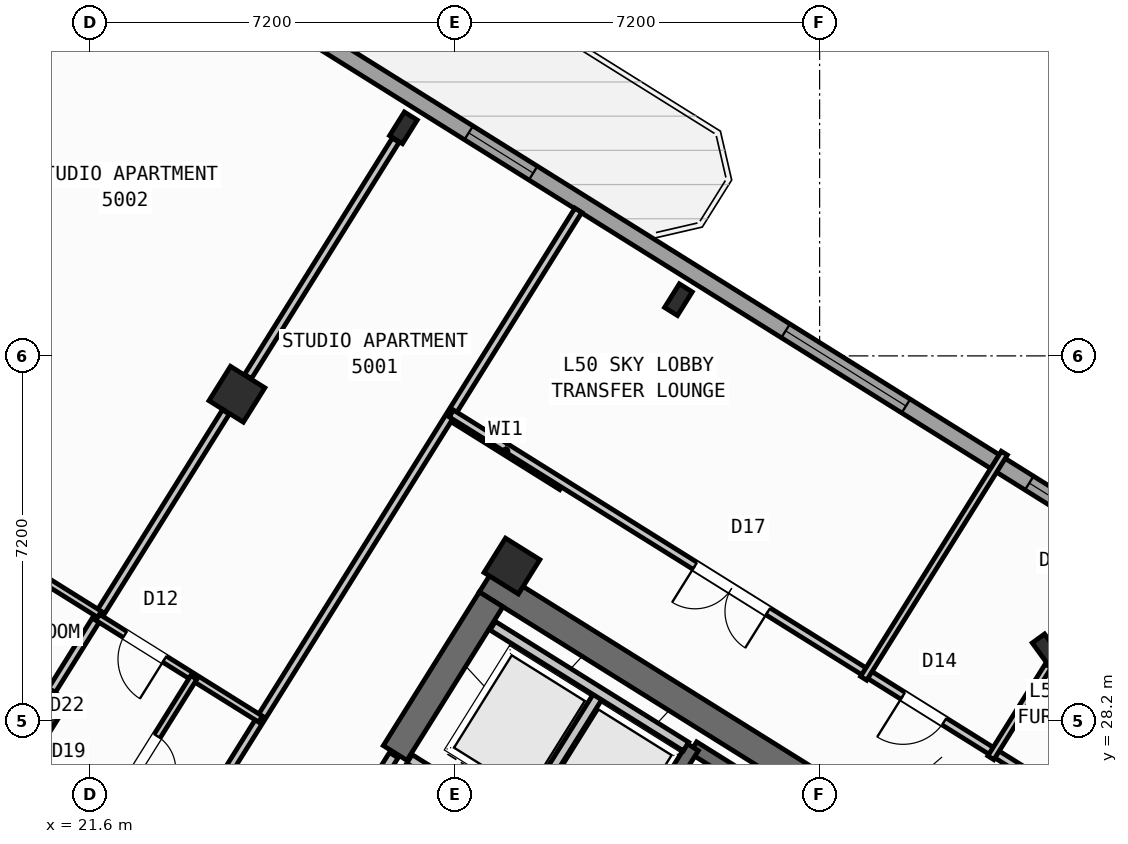
"""IFC4 building model, lengths in metres.
Left out: names, types, materials, properties, quantities, classifications, styles, units other than length and angle.
Written with IfcOpenShell. Run it as: python <this file> out.ifc"""

import sys

from ifc_helpers import new_model, si_unit, direction, frame, frame_2d, origin, origin_2d, place, context, subcontext, project, spatial, rectangle, hollow_rectangle, i_section, extrude, source, transform, mapped, element, fill, save


model = new_model("IFC4")
c1 = context("Model", 3, precision=1e-05, world=origin(), true_north=direction((0.0, 1.0)))
c2 = subcontext(c1, "Body", "Model", "MODEL_VIEW")
j1 = project(units=[si_unit("LENGTHUNIT", "METRE"), si_unit("PLANEANGLEUNIT", "RADIAN")], contexts=[c1])
p1 = place(None, origin())
s1 = spatial("IfcSite", under=j1, at=p1, CompositionType="ELEMENT")
p2 = place(p1, origin())
s2 = spatial("IfcBuilding", under=s1, at=p2, CompositionType="ELEMENT")
p3 = place(p2, frame((0.0, 0.0, 199.5)))
s3 = spatial("IfcBuildingStorey", under=s2, at=p3, CompositionType="ELEMENT", Elevation=199.5)
p4 = place(p3, frame((40.573, 24.01, 0.0), z_axis=(0.0, 0.0, 1.0), x_axis=(-0.848047359947, 0.529920442413, 0.0)))
e1 = element("IfcWall", 1, at=p4, inside=s3, PredefinedType="SHEAR", context=c2, shape_type="SweptSolid", body=[
    extrude(rectangle(XDim=13.14, YDim=0.55, at=frame_2d((6.57, 0.0))), origin(), (0.0, 0.0, 1.0), 4.25),
])
p5 = place(p3, frame((29.517, 30.594, 0.0), z_axis=(0.0, 0.0, 1.0), x_axis=(-0.529906864564, -0.848055844204, 0.0)))
e2 = element("IfcWall", 2, at=p5, inside=s3, PredefinedType="SHEAR", context=c2, shape_type="SweptSolid", body=[
    extrude(rectangle(XDim=3.575, YDim=0.55, at=frame_2d((1.788, 0.0))), origin(), (0.0, 0.0, 1.0), 4.25),
])
m1 = source(origin(), c2, "Body", "SweptSolid", [
    extrude(i_section(OverallWidth=0.3, OverallDepth=0.55, WebThickness=0.015, FlangeThickness=0.029, at=origin_2d()), origin(), (0.0, 0.0, 1.0), 4.5),
])
p6 = place(p3, frame((33.213, 36.509, 0.0), z_axis=(0.0, 0.0, 1.0), x_axis=(-0.848048096156, 0.529919264233, 0.0)))
e3 = element("IfcColumn", 3, at=p6, inside=s3, PredefinedType="COLUMN", context=c2, shape_type="MappedRepresentation", body=[
    mapped(m1, transform((0.0, 0.0, 0.0), scale=1.0)),
])
m2 = source(origin(), c2, "Body", "SweptSolid", [
    extrude(hollow_rectangle(XDim=0.8, YDim=0.8, WallThickness=0.032, at=origin_2d()), origin(), (0.0, 0.0, 1.0), 4.5),
])
p7 = place(p3, frame((29.928, 31.251, 0.0), z_axis=(0.0, 0.0, 1.0), x_axis=(-0.848048096156, 0.529919264233, 0.0)))
e4 = element("IfcColumn", 4, at=p7, inside=s3, PredefinedType="COLUMN", context=c2, shape_type="MappedRepresentation", body=[
    mapped(m2, transform((0.0, 0.0, 0.0), scale=1.0)),
])
p8 = place(p3, frame((27.786, 39.901, 0.0), z_axis=(0.0, 0.0, 1.0), x_axis=(-0.848048096156, 0.529919264233, 0.0)))
e5 = element("IfcColumn", 5, at=p8, inside=s3, PredefinedType="COLUMN", context=c2, shape_type="MappedRepresentation", body=[
    mapped(m1, transform((0.0, 0.0, 0.0), scale=1.0)),
])
for number, where, z_axis, x_axis in (
    (6, (24.5, 34.643, 0.0), (0.0, 0.0, 1.0), (-0.848, 0.53, 0.0)),
    (7, (20.632, 28.452, 0.0), (0.0, 0.0, 1.0), (-0.848, 0.53, 0.0)),
):
    element("IfcColumn", number, at=place(p3, frame(where, z_axis=z_axis, x_axis=x_axis)), inside=s3, PredefinedType="COLUMN", context=c2, shape_type="MappedRepresentation", body=[
        mapped(m2, transform((0.0, 0.0, 0.0), scale=1.0)),
    ])
p9 = place(p3, frame((40.479, 29.601, 0.0), z_axis=(0.0, 0.0, 1.0), x_axis=(0.809016994375, 0.587785252292, 0.0)))
e8 = element("IfcColumn", 8, at=p9, inside=s3, PredefinedType="COLUMN", context=c2, shape_type="MappedRepresentation", body=[
    mapped(m1, transform((0.0, 0.0, 0.0), scale=1.0)),
])
p10 = place(p3, frame((31.76, 12.183, 0.0), z_axis=(0.0, 0.0, 1.0), x_axis=(-0.848047074256, 0.529920899612, 0.0)))
e9 = element("IfcWall", 9, at=p10, inside=s3, PredefinedType="STANDARD", context=c2, shape_type="SweptSolid", body=[
    extrude(rectangle(XDim=30.652, YDim=0.32, at=frame_2d((15.326, 0.0))), origin(), (0.0, 0.0, 1.0), 4.25),
])
p11 = place(p10, frame((15.166, 0.0, 0.0)))
e10 = element("IfcOpeningElement", 10, at=p11, cuts=e9, PredefinedType="OPENING", context=c2, shape_type="SweptSolid", body=[
    extrude(rectangle(XDim=1.2, YDim=2.15, at=frame_2d((0.6, 1.075))), frame((0.0, 0.17, 0.0), z_axis=(0.0, -1.0, 0.0), x_axis=(1.0, 0.0, 0.0)), (0.0, 0.0, 1.0), 0.34),
])
p12 = place(p10, frame((1.665, 0.0, 0.65)))
e11 = element("IfcOpeningElement", 11, at=p12, cuts=e9, PredefinedType="OPENING", context=c2, shape_type="SweptSolid", body=[
    extrude(rectangle(XDim=2.8, YDim=2.1, at=frame_2d((1.4, 1.05))), frame((0.0, 0.17, 0.0), z_axis=(0.0, -1.0, 0.0), x_axis=(1.0, 0.0, 0.0)), (0.0, 0.0, 1.0), 0.34),
])
p13 = place(p10, frame((6.894, 0.0, 0.65)))
e12 = element("IfcOpeningElement", 12, at=p13, cuts=e9, PredefinedType="OPENING", context=c2, shape_type="SweptSolid", body=[
    extrude(rectangle(XDim=2.8, YDim=2.1, at=frame_2d((1.4, 1.05))), frame((0.0, 0.17, 0.0), z_axis=(0.0, -1.0, 0.0), x_axis=(1.0, 0.0, 0.0)), (0.0, 0.0, 1.0), 0.34),
])
p14 = place(p10, frame((20.453, 0.0, 0.85)))
e13 = element("IfcOpeningElement", 13, at=p14, cuts=e9, PredefinedType="OPENING", context=c2, shape_type="SweptSolid", body=[
    extrude(rectangle(XDim=1.5, YDim=1.5, at=frame_2d((0.75, 0.75))), frame((0.0, 0.17, 0.0), z_axis=(0.0, -1.0, 0.0), x_axis=(1.0, 0.0, 0.0)), (0.0, 0.0, 1.0), 0.34),
])
p15 = place(p10, frame((26.258, 0.0, 0.65)))
e14 = element("IfcOpeningElement", 14, at=p15, cuts=e9, PredefinedType="OPENING", context=c2, shape_type="SweptSolid", body=[
    extrude(rectangle(XDim=2.8, YDim=2.1, at=frame_2d((1.4, 1.05))), frame((0.0, 0.17, 0.0), z_axis=(0.0, -1.0, 0.0), x_axis=(1.0, 0.0, 0.0)), (0.0, 0.0, 1.0), 0.34),
])
p16 = place(p3, frame((17.424, 47.083, 0.0), z_axis=(0.0, 0.0, 1.0), x_axis=(0.848049927979, -0.529916332693, 0.0)))
e15 = element("IfcWall", 15, at=p16, inside=s3, PredefinedType="STANDARD", context=c2, shape_type="SweptSolid", body=[
    extrude(rectangle(XDim=29.223, YDim=0.32, at=frame_2d((14.612, 0.0))), origin(), (0.0, 0.0, 1.0), 4.25),
])
p17 = place(p16, frame((2.949, 0.0, 0.0)))
e16 = element("IfcOpeningElement", 16, at=p17, cuts=e15, PredefinedType="OPENING", context=c2, shape_type="SweptSolid", body=[
    extrude(rectangle(XDim=1.05, YDim=2.15, at=frame_2d((0.525, 1.075))), frame((0.0, 0.17, 0.0), z_axis=(0.0, -1.0, 0.0), x_axis=(1.0, 0.0, 0.0)), (0.0, 0.0, 1.0), 0.34),
])
p18 = place(p16, frame((0.789, 0.0, 0.85)))
e17 = element("IfcOpeningElement", 17, at=p18, cuts=e15, PredefinedType="OPENING", context=c2, shape_type="SweptSolid", body=[
    extrude(rectangle(XDim=1.5, YDim=1.5, at=frame_2d((0.75, 0.75))), frame((0.0, 0.17, 0.0), z_axis=(0.0, -1.0, 0.0), x_axis=(1.0, 0.0, 0.0)), (0.0, 0.0, 1.0), 0.34),
])
p19 = place(p16, frame((8.329, 0.0, 0.8)))
e18 = element("IfcOpeningElement", 18, at=p19, cuts=e15, PredefinedType="OPENING", context=c2, shape_type="SweptSolid", body=[
    extrude(rectangle(XDim=2.1, YDim=1.55, at=frame_2d((1.05, 0.775))), frame((0.0, 0.17, 0.0), z_axis=(0.0, -1.0, 0.0), x_axis=(1.0, 0.0, 0.0)), (0.0, 0.0, 1.0), 0.34),
])
p20 = place(p16, frame((13.739, 0.0, 0.85)))
e19 = element("IfcOpeningElement", 19, at=p20, cuts=e15, PredefinedType="OPENING", context=c2, shape_type="SweptSolid", body=[
    extrude(rectangle(XDim=1.5, YDim=1.5, at=frame_2d((0.75, 0.75))), frame((0.0, 0.17, 0.0), z_axis=(0.0, -1.0, 0.0), x_axis=(1.0, 0.0, 0.0)), (0.0, 0.0, 1.0), 0.34),
])
p21 = place(p16, frame((21.114, 0.0, 0.65)))
e20 = element("IfcOpeningElement", 20, at=p21, cuts=e15, PredefinedType="OPENING", context=c2, shape_type="SweptSolid", body=[
    extrude(rectangle(XDim=2.8, YDim=2.1, at=frame_2d((1.4, 1.05))), frame((0.0, 0.17, 0.0), z_axis=(0.0, -1.0, 0.0), x_axis=(1.0, 0.0, 0.0)), (0.0, 0.0, 1.0), 0.34),
])
p22 = place(p16, frame((26.784, 0.0, 0.85)))
e21 = element("IfcOpeningElement", 21, at=p22, cuts=e15, PredefinedType="OPENING", context=c2, shape_type="SweptSolid", body=[
    extrude(rectangle(XDim=1.5, YDim=1.5, at=frame_2d((0.75, 0.75))), frame((0.0, 0.17, 0.0), z_axis=(0.0, -1.0, 0.0), x_axis=(1.0, 0.0, 0.0)), (0.0, 0.0, 1.0), 0.34),
])
p23 = place(p3, frame((39.721, 23.788, 0.0), z_axis=(0.0, 0.0, 1.0), x_axis=(-0.848054434086, 0.529909121291, 0.0)))
e22 = element("IfcWall", 22, at=p23, inside=s3, PredefinedType="SHEAR", context=c2, shape_type="SweptSolid", body=[
    extrude(rectangle(XDim=7.33, YDim=0.26, at=frame_2d((3.665, 0.0))), origin(), (0.0, 0.0, 1.0), 4.25),
])
p24 = place(p3, frame((33.496, 27.677, 0.0), z_axis=(0.0, 0.0, 1.0), x_axis=(-0.529908658664, -0.84805472316, 0.0)))
e23 = element("IfcWall", 23, at=p24, inside=s3, PredefinedType="SHEAR", context=c2, shape_type="SweptSolid", body=[
    extrude(rectangle(XDim=3.16, YDim=0.26, at=frame_2d((1.58, 0.0))), origin(), (0.0, 0.0, 1.0), 4.25),
])
p25 = place(p3, frame((31.822, 24.998, 0.0), z_axis=(0.0, 0.0, 1.0), x_axis=(-0.848036912365, 0.52993716162, 0.0)))
e24 = element("IfcWall", 24, at=p25, inside=s3, PredefinedType="STANDARD", context=c2, shape_type="SweptSolid", body=[
    extrude(rectangle(XDim=4.618, YDim=0.2, at=frame_2d((2.309, 0.0))), origin(), (0.0, 0.0, 1.0), 4.24),
])
p26 = place(p25, frame((0.52, 0.0, 0.0)))
e25 = element("IfcOpeningElement", 25, at=p26, cuts=e24, PredefinedType="OPENING", context=c2, shape_type="SweptSolid", body=[
    extrude(rectangle(XDim=1.2, YDim=2.15, at=frame_2d((0.6, 1.075))), frame((0.0, 0.11, 0.0), z_axis=(0.0, -1.0, 0.0), x_axis=(1.0, 0.0, 0.0)), (0.0, 0.0, 1.0), 0.22),
])
p27 = place(p25, frame((2.66, 0.0, 0.0)))
e26 = element("IfcOpeningElement", 26, at=p27, cuts=e24, PredefinedType="OPENING", context=c2, shape_type="SweptSolid", body=[
    extrude(rectangle(XDim=1.2, YDim=2.15, at=frame_2d((0.6, 1.075))), frame((0.0, 0.11, 0.0), z_axis=(0.0, -1.0, 0.0), x_axis=(1.0, 0.0, 0.0)), (0.0, 0.0, 1.0), 0.22),
])
p28 = place(p3, frame((31.645, 28.716, 0.0), z_axis=(0.0, 0.0, 1.0), x_axis=(-0.52986693015, -0.848080795876, 0.0)))
e27 = element("IfcWall", 27, at=p28, inside=s3, PredefinedType="STANDARD", context=c2, shape_type="SweptSolid", body=[
    extrude(rectangle(XDim=2.66, YDim=0.2, at=frame_2d((1.33, 0.0))), origin(), (0.0, 0.0, 1.0), 4.24),
])
p29 = place(p3, frame((33.363, 27.69, 0.0), z_axis=(0.0, 0.0, 1.0), x_axis=(-0.848047090064, 0.529920874315, 0.0)))
e28 = element("IfcWall", 28, at=p29, inside=s3, PredefinedType="STANDARD", context=c2, shape_type="SweptSolid", body=[
    extrude(rectangle(XDim=4.498, YDim=0.2, at=frame_2d((2.249, 0.0))), origin(), (0.0, 0.0, 1.0), 4.24),
])
p30 = place(p3, frame((27.596, 27.52, 0.0), z_axis=(0.0, 0.0, 1.0), x_axis=(-0.529865479138, -0.848081702443, 0.0)))
e29 = element("IfcWall", 29, at=p30, inside=s3, PredefinedType="STANDARD", context=c2, shape_type="SweptSolid", body=[
    extrude(rectangle(XDim=2.96, YDim=0.2, at=frame_2d((1.48, 0.0))), origin(), (0.0, 0.0, 1.0), 4.24),
])
p31 = place(p30, frame((1.76, 0.0, 0.0)))
e30 = element("IfcOpeningElement", 30, at=p31, cuts=e29, PredefinedType="OPENING", context=c2, shape_type="SweptSolid", body=[
    extrude(rectangle(XDim=0.86, YDim=2.05, at=frame_2d((0.43, 1.025))), frame((0.0, 0.11, 0.0), z_axis=(0.0, -1.0, 0.0), x_axis=(1.0, 0.0, 0.0)), (0.0, 0.0, 1.0), 0.22),
])
p32 = place(p3, frame((30.914, 32.829, 0.0), z_axis=(0.0, 0.0, 1.0), x_axis=(-0.848008813643, 0.529982124211, 0.0)))
e31 = element("IfcWall", 31, at=p32, inside=s3, PredefinedType="PARTITIONING", context=c2, shape_type="SweptSolid", body=[
    extrude(rectangle(XDim=2.61, YDim=0.16, at=frame_2d((1.305, 0.0))), origin(), (0.0, 0.0, 1.0), 4.24),
])
p33 = place(p3, frame((31.239, 38.274, 0.0), z_axis=(0.0, 0.0, 1.0), x_axis=(-0.529918877109, -0.848048338059, 0.0)))
e32 = element("IfcWall", 32, at=p33, inside=s3, PredefinedType="PARTITIONING", context=c2, shape_type="SweptSolid", body=[
    extrude(rectangle(XDim=15.35, YDim=0.16, at=frame_2d((7.675, 0.0))), origin(), (0.0, 0.0, 1.0), 4.24),
])
p34 = place(p3, frame((23.104, 25.256, 0.0), z_axis=(0.0, 0.0, 1.0), x_axis=(-0.848041752158, 0.529929416617, 0.0)))
e33 = element("IfcWall", 33, at=p34, inside=s3, PredefinedType="PARTITIONING", context=c2, shape_type="SweptSolid", body=[
    extrude(rectangle(XDim=16.73, YDim=0.16, at=frame_2d((8.365, 0.0))), origin(), (0.0, 0.0, 1.0), 4.24),
])
p35 = place(p34, frame((2.22, 0.0, 0.0)))
e34 = element("IfcOpeningElement", 34, at=p35, cuts=e33, PredefinedType="OPENING", context=c2, shape_type="SweptSolid", body=[
    extrude(rectangle(XDim=0.86, YDim=2.05, at=frame_2d((0.43, 1.025))), frame((0.0, 0.09, 0.0), z_axis=(0.0, -1.0, 0.0), x_axis=(1.0, 0.0, 0.0)), (0.0, 0.0, 1.0), 0.18),
])
p36 = place(p34, frame((12.084, 0.0, 0.0)))
e35 = element("IfcOpeningElement", 35, at=p36, cuts=e33, PredefinedType="OPENING", context=c2, shape_type="SweptSolid", body=[
    extrude(rectangle(XDim=1.0, YDim=2.1, at=frame_2d((0.5, 1.05))), frame((0.0, 0.09, 0.0), z_axis=(0.0, -1.0, 0.0), x_axis=(1.0, 0.0, 0.0)), (0.0, 0.0, 1.0), 0.18),
])
p37 = place(p3, frame((21.938, 23.391, 0.0), z_axis=(0.0, 0.0, 1.0), x_axis=(-0.848045850158, 0.529922858565, 0.0)))
e36 = element("IfcWall", 36, at=p37, inside=s3, PredefinedType="PARTITIONING", context=c2, shape_type="SweptSolid", body=[
    extrude(rectangle(XDim=16.73, YDim=0.16, at=frame_2d((8.365, 0.0))), origin(), (0.0, 0.0, 1.0), 4.24),
])
p38 = place(p37, frame((1.505, 0.0, 0.0)))
e37 = element("IfcOpeningElement", 37, at=p38, cuts=e36, PredefinedType="OPENING", context=c2, shape_type="SweptSolid", body=[
    extrude(rectangle(XDim=1.0, YDim=2.1, at=frame_2d((0.5, 1.05))), frame((0.0, 0.09, 0.0), z_axis=(0.0, -1.0, 0.0), x_axis=(1.0, 0.0, 0.0)), (0.0, 0.0, 1.0), 0.18),
])
p39 = place(p37, frame((6.435, 0.0, 0.0)))
e38 = element("IfcOpeningElement", 38, at=p39, cuts=e36, PredefinedType="OPENING", context=c2, shape_type="SweptSolid", body=[
    extrude(rectangle(XDim=1.0, YDim=2.1, at=frame_2d((0.5, 1.05))), frame((0.0, 0.09, 0.0), z_axis=(0.0, -1.0, 0.0), x_axis=(1.0, 0.0, 0.0)), (0.0, 0.0, 1.0), 0.18),
])
p40 = place(p37, frame((12.784, 0.0, 0.0)))
e39 = element("IfcOpeningElement", 39, at=p40, cuts=e36, PredefinedType="OPENING", context=c2, shape_type="SweptSolid", body=[
    extrude(rectangle(XDim=1.0, YDim=2.1, at=frame_2d((0.5, 1.05))), frame((0.0, 0.09, 0.0), z_axis=(0.0, -1.0, 0.0), x_axis=(1.0, 0.0, 0.0)), (0.0, 0.0, 1.0), 0.18),
])
p41 = place(p3, frame((27.634, 39.657, 0.0), z_axis=(0.0, 0.0, 1.0), x_axis=(-0.529899205623, -0.848060629837, 0.0)))
e40 = element("IfcWall", 40, at=p41, inside=s3, PredefinedType="PARTITIONING", context=c2, shape_type="SweptSolid", body=[
    extrude(rectangle(XDim=5.501, YDim=0.16, at=frame_2d((2.75, 0.0))), origin(), (0.0, 0.0, 1.0), 3.725),
])
p42 = place(p3, frame((24.282, 34.293, 0.0), z_axis=(0.0, 0.0, 1.0), x_axis=(-0.529934553702, -0.848038542045, 0.0)))
e41 = element("IfcWall", 41, at=p42, inside=s3, PredefinedType="PARTITIONING", context=c2, shape_type="SweptSolid", body=[
    extrude(rectangle(XDim=6.476, YDim=0.16, at=frame_2d((3.238, 0.0))), origin(), (0.0, 0.0, 1.0), 3.725),
])
p43 = place(p3, frame((24.964, 28.233, 0.0), z_axis=(0.0, 0.0, 1.0), x_axis=(-0.848059820872, 0.529900500304, 0.0)))
e42 = element("IfcWall", 42, at=p43, inside=s3, PredefinedType="PLUMBINGWALL", context=c2, shape_type="SweptSolid", body=[
    extrude(rectangle(XDim=3.79, YDim=0.14, at=frame_2d((1.895, 0.0))), origin(), (0.0, 0.0, 1.0), 4.24),
])
p44 = place(p43, frame((2.23, 0.0, 0.0)))
e43 = element("IfcOpeningElement", 43, at=p44, cuts=e42, PredefinedType="OPENING", context=c2, shape_type="SweptSolid", body=[
    extrude(rectangle(XDim=0.92, YDim=2.08, at=frame_2d((0.46, 1.04))), frame((0.0, 0.08, 0.0), z_axis=(0.0, -1.0, 0.0), x_axis=(1.0, 0.0, 0.0)), (0.0, 0.0, 1.0), 0.16),
])
p45 = place(p3, frame((23.65, 29.054, 0.0), z_axis=(0.0, 0.0, 1.0), x_axis=(-0.529898896701, -0.848060822863, 0.0)))
e44 = element("IfcWall", 44, at=p45, inside=s3, PredefinedType="PLUMBINGWALL", context=c2, shape_type="SweptSolid", body=[
    extrude(rectangle(XDim=3.51, YDim=0.14, at=frame_2d((1.755, 0.0))), origin(), (0.0, 0.0, 1.0), 3.895),
])
p46 = place(p45, frame((1.365, 0.0, 0.0)))
e45 = element("IfcOpeningElement", 45, at=p46, cuts=e44, PredefinedType="OPENING", context=c2, shape_type="SweptSolid", body=[
    extrude(rectangle(XDim=0.78, YDim=2.05, at=frame_2d((0.39, 1.025))), frame((0.0, 0.08, 0.0), z_axis=(0.0, -1.0, 0.0), x_axis=(1.0, 0.0, 0.0)), (0.0, 0.0, 1.0), 0.16),
])
p47 = place(p3, frame((21.787, 30.301, 0.0), z_axis=(0.0, 0.0, 1.0), x_axis=(-0.848043949058, 0.52992590092, 0.0)))
e46 = element("IfcWall", 46, at=p47, inside=s3, PredefinedType="PLUMBINGWALL", context=c2, shape_type="SweptSolid", body=[
    extrude(rectangle(XDim=12.92, YDim=0.14, at=frame_2d((6.46, 0.0))), origin(), (0.0, 0.0, 1.0), 4.24),
])
p48 = place(p47, frame((5.849, 0.0, 0.0)))
e47 = element("IfcOpeningElement", 47, at=p48, cuts=e46, PredefinedType="OPENING", context=c2, shape_type="SweptSolid", body=[
    extrude(rectangle(XDim=0.92, YDim=2.08, at=frame_2d((0.46, 1.04))), frame((0.0, 0.08, 0.0), z_axis=(0.0, -1.0, 0.0), x_axis=(1.0, 0.0, 0.0)), (0.0, 0.0, 1.0), 0.16),
])
p49 = place(p3, frame((21.375, 44.756, 0.0), z_axis=(0.0, 0.0, 1.0), x_axis=(-0.529905980331, -0.848056396715, 0.0)))
e48 = element("IfcWall", 48, at=p49, inside=s3, PredefinedType="PARTITIONING", context=c2, shape_type="SweptSolid", body=[
    extrude(rectangle(XDim=12.04, YDim=0.11, at=frame_2d((6.02, 0.0))), origin(), (0.0, 0.0, 1.0), 4.24),
])
p50 = place(p49, frame((0.47, 0.0, 0.0)))
e49 = element("IfcOpeningElement", 49, at=p50, cuts=e48, PredefinedType="OPENING", context=c2, shape_type="SweptSolid", body=[
    extrude(rectangle(XDim=0.92, YDim=2.08, at=frame_2d((0.46, 1.04))), frame((0.0, 0.065, 0.0), z_axis=(0.0, -1.0, 0.0), x_axis=(1.0, 0.0, 0.0)), (0.0, 0.0, 1.0), 0.13),
])
p51 = place(p3, frame((41.936, 26.012, 0.0), z_axis=(0.0, 0.0, 1.0), x_axis=(-0.848051154596, 0.529914369676, 0.0)))
e50 = element("IfcWall", 50, at=p51, inside=s3, PredefinedType="PARTITIONING", context=c2, shape_type="SweptSolid", body=[
    extrude(rectangle(XDim=15.57, YDim=0.16, at=frame_2d((7.785, 0.0))), origin(), (0.0, 0.0, 1.0), 4.24),
])
p52 = place(p51, frame((4.1, 0.0, 0.0)))
e51 = element("IfcOpeningElement", 51, at=p52, cuts=e50, PredefinedType="OPENING", context=c2, shape_type="SweptSolid", body=[
    extrude(rectangle(XDim=0.96, YDim=2.08, at=frame_2d((0.48, 1.04))), frame((0.0, 0.09, 0.0), z_axis=(0.0, -1.0, 0.0), x_axis=(1.0, 0.0, 0.0)), (0.0, 0.0, 1.0), 0.18),
])
p53 = place(p51, frame((8.2, 0.0, 0.0)))
e52 = element("IfcOpeningElement", 52, at=p53, cuts=e50, PredefinedType="OPENING", context=c2, shape_type="SweptSolid", body=[
    extrude(rectangle(XDim=1.7, YDim=2.2, at=frame_2d((0.85, 1.1))), frame((0.0, 0.09, 0.0), z_axis=(0.0, -1.0, 0.0), x_axis=(1.0, 0.0, 0.0)), (0.0, 0.0, 1.0), 0.18),
])
p54 = place(p3, frame((40.512, 29.281, 0.0), z_axis=(0.0, 0.0, 1.0), x_axis=(-0.529947607416, -0.848030384712, 0.0)))
e53 = element("IfcWall", 53, at=p54, inside=s3, PredefinedType="PLUMBINGWALL", context=c2, shape_type="SweptSolid", body=[
    extrude(rectangle(XDim=2.138, YDim=0.14, at=frame_2d((1.069, 0.0))), origin(), (0.0, 0.0, 1.0), 4.24),
])
p55 = place(p3, frame((39.646, 33.48, 0.0), z_axis=(0.0, 0.0, 1.0), x_axis=(-0.529923555071, -0.848045414928, 0.0)))
e54 = element("IfcWall", 54, at=p55, inside=s3, PredefinedType="PLUMBINGWALL", context=c2, shape_type="SweptSolid", body=[
    extrude(rectangle(XDim=5.24, YDim=0.14, at=frame_2d((2.62, 0.0))), origin(), (0.0, 0.0, 1.0), 4.24),
])
m3 = source(origin(), c2, "Body", "SweptSolid", [
    extrude(rectangle(XDim=1.5, YDim=1.5, at=frame_2d((0.75, 0.75))), frame((0.0, 0.03, 0.0), z_axis=(0.0, -1.0, 0.0), x_axis=(1.0, 0.0, 0.0)), (0.0, 0.0, 1.0), 0.06),
])
p56 = place(p20, origin())
e55 = element("IfcWindow", 55, at=p56, inside=s3, PartitioningType="SINGLE_PANEL", PredefinedType="WINDOW", context=c2, shape_type="MappedRepresentation", body=[
    mapped(m3, transform((0.0, 0.0, 0.0), scale=1.0)),
])
fill(e19, e55)
m4 = source(origin(), c2, "Body", "SweptSolid", [
    extrude(rectangle(XDim=2.8, YDim=2.1, at=frame_2d((1.4, 1.05))), frame((0.0, 0.03, 0.0), z_axis=(0.0, -1.0, 0.0), x_axis=(1.0, 0.0, 0.0)), (0.0, 0.0, 1.0), 0.06),
])
p57 = place(p21, origin())
e56 = element("IfcWindow", 56, at=p57, inside=s3, PartitioningType="SINGLE_PANEL", PredefinedType="WINDOW", context=c2, shape_type="MappedRepresentation", body=[
    mapped(m4, transform((0.0, 0.0, 0.0), scale=1.0)),
])
fill(e20, e56)
p58 = place(p22, origin())
e57 = element("IfcWindow", 57, at=p58, inside=s3, PartitioningType="SINGLE_PANEL", PredefinedType="WINDOW", context=c2, shape_type="MappedRepresentation", body=[
    mapped(m3, transform((0.0, 0.0, 0.0), scale=1.0)),
])
fill(e21, e57)
m5 = source(origin(), c2, "Body", "SweptSolid", [
    extrude(rectangle(XDim=0.92, YDim=2.08, at=frame_2d((0.46, 1.04))), frame((0.0, 0.025, 0.0), z_axis=(0.0, -1.0, 0.0), x_axis=(1.0, 0.0, 0.0)), (0.0, 0.0, 1.0), 0.05),
])
p59 = place(p44, origin())
e58 = element("IfcDoor", 58, at=p59, inside=s3, OperationType="SINGLE_SWING_LEFT", PredefinedType="DOOR", context=c2, shape_type="MappedRepresentation", body=[
    mapped(m5, transform((0.0, 0.0, 0.0), scale=1.0)),
])
fill(e43, e58)
m6 = source(origin(), c2, "Body", "SweptSolid", [
    extrude(rectangle(XDim=0.78, YDim=2.05, at=frame_2d((0.39, 1.025))), frame((0.0, 0.025, 0.0), z_axis=(0.0, -1.0, 0.0), x_axis=(1.0, 0.0, 0.0)), (0.0, 0.0, 1.0), 0.05),
])
p60 = place(p46, origin())
e59 = element("IfcDoor", 59, at=p60, inside=s3, OperationType="SINGLE_SWING_RIGHT", PredefinedType="DOOR", context=c2, shape_type="MappedRepresentation", body=[
    mapped(m6, transform((0.0, 0.0, 0.0), scale=1.0)),
])
fill(e45, e59)
m7 = source(origin(), c2, "Body", "SweptSolid", [
    extrude(rectangle(XDim=0.96, YDim=2.08, at=frame_2d((0.48, 1.04))), frame((0.0, 0.025, 0.0), z_axis=(0.0, -1.0, 0.0), x_axis=(1.0, 0.0, 0.0)), (0.0, 0.0, 1.0), 0.05),
])
p61 = place(p52, origin())
e60 = element("IfcDoor", 60, at=p61, inside=s3, OperationType="SINGLE_SWING_RIGHT", PredefinedType="DOOR", context=c2, shape_type="MappedRepresentation", body=[
    mapped(m7, transform((0.0, 0.0, 0.0), scale=1.0)),
])
fill(e51, e60)
m8 = source(origin(), c2, "Body", "SweptSolid", [
    extrude(rectangle(XDim=1.7, YDim=2.2, at=frame_2d((0.85, 1.1))), frame((0.0, 0.025, 0.0), z_axis=(0.0, -1.0, 0.0), x_axis=(1.0, 0.0, 0.0)), (0.0, 0.0, 1.0), 0.05),
])
p62 = place(p53, origin())
e61 = element("IfcDoor", 61, at=p62, inside=s3, OperationType="DOUBLE_DOOR_SINGLE_SWING", PredefinedType="DOOR", context=c2, shape_type="MappedRepresentation", body=[
    mapped(m8, transform((0.0, 0.0, 0.0), scale=1.0)),
])
fill(e52, e61)
save(model, sys.argv[1])
